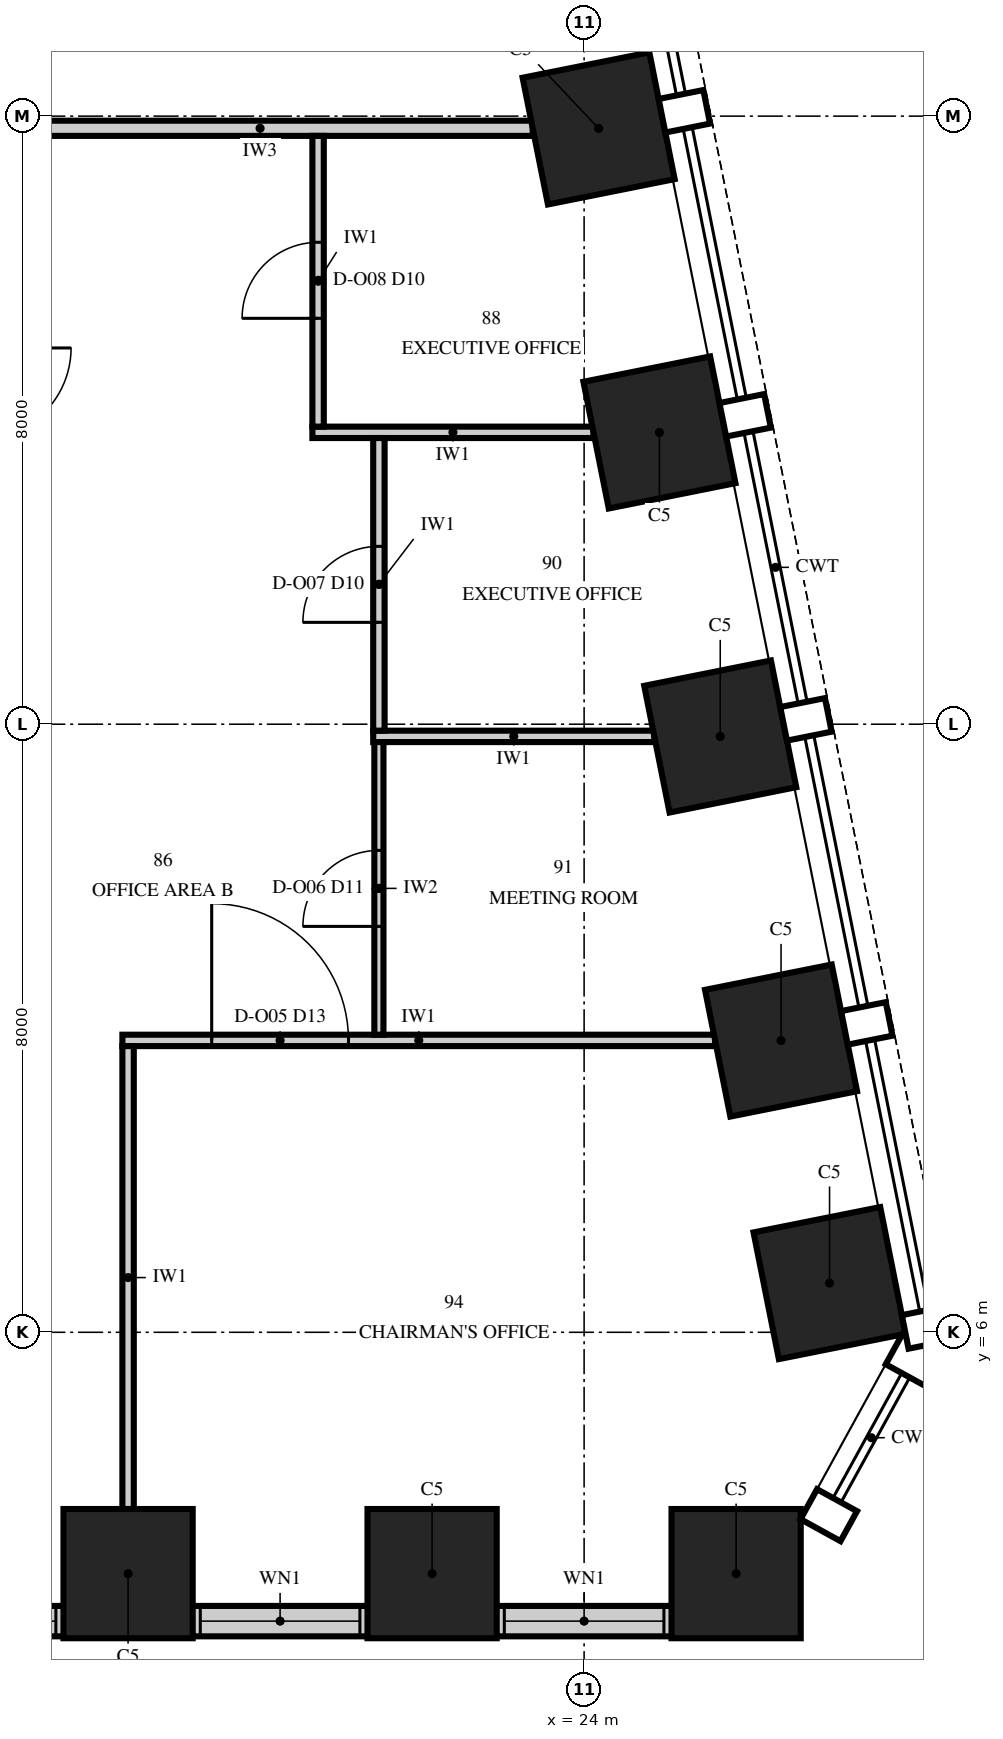
"""IFC4 building model, lengths in metres.
Left out: names, types, materials, properties, quantities, classifications, styles, units other than length and angle.
Written with IfcOpenShell. Run it as: python <this file> out.ifc"""

import sys

from ifc_helpers import new_model, si_unit, direction, frame, frame_2d, origin, origin_2d, place, context, subcontext, project, spatial, rectangle, extrude, element, fill, save


model = new_model("IFC4")
c1 = context("Model", 3, precision=1e-05, world=origin(), true_north=direction((0.0, 1.0)))
c2 = subcontext(c1, "Body", "Model", "MODEL_VIEW")
j1 = project(units=[si_unit("LENGTHUNIT", "METRE"), si_unit("PLANEANGLEUNIT", "RADIAN")], contexts=[c1])
p1 = place(None, origin())
s1 = spatial("IfcSite", under=j1, at=p1, CompositionType="ELEMENT")
p2 = place(p1, origin())
s2 = spatial("IfcBuilding", under=s1, at=p2, CompositionType="ELEMENT")
p3 = place(p2, frame((0.0, 0.0, 312.0)))
s3 = spatial("IfcBuildingStorey", under=s2, at=p3, CompositionType="ELEMENT", Elevation=312.0)
for number, where, z_axis, x_axis in (
    (1, (18.0, 2.825, 0.0), (0.0, 0.0, 1.0), (1.0, 0.0, 0.0)),
    (2, (22.0, 2.825, 0.0), (0.0, 0.0, 1.0), (1.0, 0.0, 0.0)),
    (3, (26.0, 2.825, 0.0), (0.0, 0.0, 1.0), (1.0, 0.0, 0.0)),
    (4, (27.229, 6.647, 0.0), (0.0, 0.0, 1.0), (-0.196, 0.981, 0.0)),
    (5, (26.591, 9.838, 0.0), (0.0, 0.0, 1.0), (-0.196, 0.981, 0.0)),
    (6, (25.791, 13.838, 0.0), (0.0, 0.0, 1.0), (-0.196, 0.981, 0.0)),
    (7, (24.991, 17.838, 0.0), (0.0, 0.0, 1.0), (-0.196, 0.981, 0.0)),
    (8, (24.191, 21.838, 0.0), (0.0, 0.0, 1.0), (-0.196, 0.981, 0.0)),
):
    element("IfcColumn", number, at=place(p3, frame(where, z_axis=z_axis, x_axis=x_axis)), inside=s3, PredefinedType="COLUMN", context=c2, shape_type="SweptSolid", body=[
        extrude(rectangle(XDim=1.7, YDim=1.7, at=origin_2d()), origin(), (0.0, 0.0, 1.0), 4.0),
    ])
p4 = place(p3, frame((-26.0, 2.2, 0.0), z_axis=(0.0, 0.0, 1.0), x_axis=(1.0, 0.0, 0.0)))
e9 = element("IfcWall", 9, at=p4, inside=s3, PredefinedType="SOLIDWALL", context=c2, shape_type="SweptSolid", body=[
    extrude(rectangle(XDim=52.0, YDim=0.4, at=frame_2d((26.0, 0.0))), origin(), (0.0, 0.0, 1.0), 2.0),
])
p5 = place(p4, frame((0.95, 0.0, 0.8)))
e10 = element("IfcOpeningElement", 10, at=p5, cuts=e9, PredefinedType="OPENING", context=c2, shape_type="SweptSolid", body=[
    extrude(rectangle(XDim=2.1, YDim=1.15, at=frame_2d((1.05, 0.575))), frame((0.0, 0.215, 0.0), z_axis=(0.0, -1.0, 0.0), x_axis=(1.0, 0.0, 0.0)), (0.0, 0.0, 1.0), 0.43),
])
p6 = place(p4, frame((4.95, 0.0, 0.8)))
e11 = element("IfcOpeningElement", 11, at=p6, cuts=e9, PredefinedType="OPENING", context=c2, shape_type="SweptSolid", body=[
    extrude(rectangle(XDim=2.1, YDim=1.15, at=frame_2d((1.05, 0.575))), frame((0.0, 0.215, 0.0), z_axis=(0.0, -1.0, 0.0), x_axis=(1.0, 0.0, 0.0)), (0.0, 0.0, 1.0), 0.43),
])
p7 = place(p4, frame((8.95, 0.0, 0.8)))
e12 = element("IfcOpeningElement", 12, at=p7, cuts=e9, PredefinedType="OPENING", context=c2, shape_type="SweptSolid", body=[
    extrude(rectangle(XDim=2.1, YDim=1.15, at=frame_2d((1.05, 0.575))), frame((0.0, 0.215, 0.0), z_axis=(0.0, -1.0, 0.0), x_axis=(1.0, 0.0, 0.0)), (0.0, 0.0, 1.0), 0.43),
])
p8 = place(p4, frame((12.95, 0.0, 0.8)))
e13 = element("IfcOpeningElement", 13, at=p8, cuts=e9, PredefinedType="OPENING", context=c2, shape_type="SweptSolid", body=[
    extrude(rectangle(XDim=2.1, YDim=1.15, at=frame_2d((1.05, 0.575))), frame((0.0, 0.215, 0.0), z_axis=(0.0, -1.0, 0.0), x_axis=(1.0, 0.0, 0.0)), (0.0, 0.0, 1.0), 0.43),
])
p9 = place(p4, frame((16.95, 0.0, 0.8)))
e14 = element("IfcOpeningElement", 14, at=p9, cuts=e9, PredefinedType="OPENING", context=c2, shape_type="SweptSolid", body=[
    extrude(rectangle(XDim=2.1, YDim=1.15, at=frame_2d((1.05, 0.575))), frame((0.0, 0.215, 0.0), z_axis=(0.0, -1.0, 0.0), x_axis=(1.0, 0.0, 0.0)), (0.0, 0.0, 1.0), 0.43),
])
p10 = place(p4, frame((20.95, 0.0, 0.8)))
e15 = element("IfcOpeningElement", 15, at=p10, cuts=e9, PredefinedType="OPENING", context=c2, shape_type="SweptSolid", body=[
    extrude(rectangle(XDim=2.1, YDim=1.15, at=frame_2d((1.05, 0.575))), frame((0.0, 0.215, 0.0), z_axis=(0.0, -1.0, 0.0), x_axis=(1.0, 0.0, 0.0)), (0.0, 0.0, 1.0), 0.43),
])
p11 = place(p4, frame((24.95, 0.0, 0.8)))
e16 = element("IfcOpeningElement", 16, at=p11, cuts=e9, PredefinedType="OPENING", context=c2, shape_type="SweptSolid", body=[
    extrude(rectangle(XDim=2.1, YDim=1.15, at=frame_2d((1.05, 0.575))), frame((0.0, 0.215, 0.0), z_axis=(0.0, -1.0, 0.0), x_axis=(1.0, 0.0, 0.0)), (0.0, 0.0, 1.0), 0.43),
])
p12 = place(p4, frame((28.95, 0.0, 0.8)))
e17 = element("IfcOpeningElement", 17, at=p12, cuts=e9, PredefinedType="OPENING", context=c2, shape_type="SweptSolid", body=[
    extrude(rectangle(XDim=2.1, YDim=1.15, at=frame_2d((1.05, 0.575))), frame((0.0, 0.215, 0.0), z_axis=(0.0, -1.0, 0.0), x_axis=(1.0, 0.0, 0.0)), (0.0, 0.0, 1.0), 0.43),
])
p13 = place(p4, frame((32.95, 0.0, 0.8)))
e18 = element("IfcOpeningElement", 18, at=p13, cuts=e9, PredefinedType="OPENING", context=c2, shape_type="SweptSolid", body=[
    extrude(rectangle(XDim=2.1, YDim=1.15, at=frame_2d((1.05, 0.575))), frame((0.0, 0.215, 0.0), z_axis=(0.0, -1.0, 0.0), x_axis=(1.0, 0.0, 0.0)), (0.0, 0.0, 1.0), 0.43),
])
p14 = place(p4, frame((36.95, 0.0, 0.8)))
e19 = element("IfcOpeningElement", 19, at=p14, cuts=e9, PredefinedType="OPENING", context=c2, shape_type="SweptSolid", body=[
    extrude(rectangle(XDim=2.1, YDim=1.15, at=frame_2d((1.05, 0.575))), frame((0.0, 0.215, 0.0), z_axis=(0.0, -1.0, 0.0), x_axis=(1.0, 0.0, 0.0)), (0.0, 0.0, 1.0), 0.43),
])
p15 = place(p4, frame((40.95, 0.0, 0.8)))
e20 = element("IfcOpeningElement", 20, at=p15, cuts=e9, PredefinedType="OPENING", context=c2, shape_type="SweptSolid", body=[
    extrude(rectangle(XDim=2.1, YDim=1.15, at=frame_2d((1.05, 0.575))), frame((0.0, 0.215, 0.0), z_axis=(0.0, -1.0, 0.0), x_axis=(1.0, 0.0, 0.0)), (0.0, 0.0, 1.0), 0.43),
])
p16 = place(p4, frame((44.95, 0.0, 0.8)))
e21 = element("IfcOpeningElement", 21, at=p16, cuts=e9, PredefinedType="OPENING", context=c2, shape_type="SweptSolid", body=[
    extrude(rectangle(XDim=2.1, YDim=1.15, at=frame_2d((1.05, 0.575))), frame((0.0, 0.215, 0.0), z_axis=(0.0, -1.0, 0.0), x_axis=(1.0, 0.0, 0.0)), (0.0, 0.0, 1.0), 0.43),
])
p17 = place(p4, frame((48.95, 0.0, 0.8)))
e22 = element("IfcOpeningElement", 22, at=p17, cuts=e9, PredefinedType="OPENING", context=c2, shape_type="SweptSolid", body=[
    extrude(rectangle(XDim=2.1, YDim=1.15, at=frame_2d((1.05, 0.575))), frame((0.0, 0.215, 0.0), z_axis=(0.0, -1.0, 0.0), x_axis=(1.0, 0.0, 0.0)), (0.0, 0.0, 1.0), 0.43),
])
p18 = place(p3, frame((17.925, 9.84, 0.0), z_axis=(0.0, 0.0, 1.0), x_axis=(1.0, 0.0, 0.0)))
e23 = element("IfcWall", 23, at=p18, inside=s3, PredefinedType="PARTITIONING", context=c2, shape_type="SweptSolid", body=[
    extrude(rectangle(XDim=7.799, YDim=0.15, at=frame_2d((3.899, 0.0))), origin(), (0.0, 0.0, 1.0), 3.23),
])
p19 = place(p18, frame((1.175, 0.0, 0.0)))
e24 = element("IfcOpeningElement", 24, at=p19, cuts=e23, PredefinedType="OPENING", context=c2, shape_type="SweptSolid", body=[
    extrude(rectangle(XDim=1.8, YDim=2.4, at=frame_2d((0.9, 1.2))), frame((0.0, 0.09, 0.0), z_axis=(0.0, -1.0, 0.0), x_axis=(1.0, 0.0, 0.0)), (0.0, 0.0, 1.0), 0.18),
])
for number, where, z_axis, x_axis in (
    (25, (21.225, 13.84, 0.0), (0.0, 0.0, 1.0), (1.0, 0.0, 0.0)),
    (26, (20.425, 17.84, 0.0), (0.0, 0.0, 1.0), (1.0, 0.0, 0.0)),
):
    element("IfcWall", number, at=place(p3, frame(where, z_axis=z_axis, x_axis=x_axis)), inside=s3, PredefinedType="PARTITIONING", context=c2, shape_type="SweptSolid", body=[
        extrude(rectangle(XDim=3.699, YDim=0.15, at=frame_2d((1.849, 0.0))), origin(), (0.0, 0.0, 1.0), 3.23),
    ])
p20 = place(p3, frame((16.15, 21.84, 0.0), z_axis=(0.0, 0.0, 1.0), x_axis=(1.0, 0.0, 0.0)))
e27 = element("IfcWall", 27, at=p20, inside=s3, PredefinedType="PARTITIONING", context=c2, shape_type="SweptSolid", body=[
    extrude(rectangle(XDim=7.174, YDim=0.2, at=frame_2d((3.587, 0.0))), origin(), (0.0, 0.0, 1.0), 3.23),
])
p21 = place(p3, frame((18.0, 3.675, 0.0), z_axis=(0.0, 0.0, 1.0), x_axis=(0.0, 1.0, 0.0)))
e28 = element("IfcWall", 28, at=p21, inside=s3, PredefinedType="PARTITIONING", context=c2, shape_type="SweptSolid", body=[
    extrude(rectangle(XDim=6.09, YDim=0.15, at=frame_2d((3.045, 0.0))), origin(), (0.0, 0.0, 1.0), 2.842),
])
p22 = place(p3, frame((20.5, 17.915, 0.0), z_axis=(0.0, 0.0, 1.0), x_axis=(0.0, 1.0, 0.0)))
e29 = element("IfcWall", 29, at=p22, inside=s3, PredefinedType="PARTITIONING", context=c2, shape_type="SweptSolid", body=[
    extrude(rectangle(XDim=3.825, YDim=0.15, at=frame_2d((1.913, 0.0))), origin(), (0.0, 0.0, 1.0), 3.23),
])
p23 = place(p22, frame((1.425, 0.0, 0.0)))
e30 = element("IfcOpeningElement", 30, at=p23, cuts=e29, PredefinedType="OPENING", context=c2, shape_type="SweptSolid", body=[
    extrude(rectangle(XDim=1.0, YDim=2.3, at=frame_2d((0.5, 1.15))), frame((0.0, 0.09, 0.0), z_axis=(0.0, -1.0, 0.0), x_axis=(1.0, 0.0, 0.0)), (0.0, 0.0, 1.0), 0.18),
])
p24 = place(p3, frame((21.3, 9.915, 0.0), z_axis=(0.0, 0.0, 1.0), x_axis=(0.0, 1.0, 0.0)))
e31 = element("IfcWall", 31, at=p24, inside=s3, PredefinedType="PARTITIONING", context=c2, shape_type="SweptSolid", body=[
    extrude(rectangle(XDim=3.85, YDim=0.12, at=frame_2d((1.925, 0.0))), origin(), (0.0, 0.0, 1.0), 3.85),
])
p25 = place(p24, frame((1.425, 0.0, 0.0)))
e32 = element("IfcOpeningElement", 32, at=p25, cuts=e31, PredefinedType="OPENING", context=c2, shape_type="SweptSolid", body=[
    extrude(rectangle(XDim=1.0, YDim=2.4, at=frame_2d((0.5, 1.2))), frame((0.0, 0.075, 0.0), z_axis=(0.0, -1.0, 0.0), x_axis=(1.0, 0.0, 0.0)), (0.0, 0.0, 1.0), 0.15),
])
p26 = place(p3, frame((21.3, 13.915, 0.0), z_axis=(0.0, 0.0, 1.0), x_axis=(0.0, 1.0, 0.0)))
e33 = element("IfcWall", 33, at=p26, inside=s3, PredefinedType="PARTITIONING", context=c2, shape_type="SweptSolid", body=[
    extrude(rectangle(XDim=3.85, YDim=0.15, at=frame_2d((1.925, 0.0))), origin(), (0.0, 0.0, 1.0), 3.23),
])
p27 = place(p26, frame((1.425, 0.0, 0.0)))
e34 = element("IfcOpeningElement", 34, at=p27, cuts=e33, PredefinedType="OPENING", context=c2, shape_type="SweptSolid", body=[
    extrude(rectangle(XDim=1.0, YDim=2.3, at=frame_2d((0.5, 1.15))), frame((0.0, 0.09, 0.0), z_axis=(0.0, -1.0, 0.0), x_axis=(1.0, 0.0, 0.0)), (0.0, 0.0, 1.0), 0.18),
])
p28 = place(p15, origin())
e35 = element("IfcWindow", 35, at=p28, inside=s3, PartitioningType="SINGLE_PANEL", PredefinedType="WINDOW", context=c2, shape_type="SweptSolid", body=[
    extrude(rectangle(XDim=2.1, YDim=1.15, at=frame_2d((1.05, 0.575))), frame((0.0, 0.03, 0.0), z_axis=(0.0, -1.0, 0.0), x_axis=(1.0, 0.0, 0.0)), (0.0, 0.0, 1.0), 0.06),
])
fill(e20, e35)
p29 = place(p16, origin())
e36 = element("IfcWindow", 36, at=p29, inside=s3, PartitioningType="SINGLE_PANEL", PredefinedType="WINDOW", context=c2, shape_type="SweptSolid", body=[
    extrude(rectangle(XDim=2.1, YDim=1.15, at=frame_2d((1.05, 0.575))), frame((0.0, 0.03, 0.0), z_axis=(0.0, -1.0, 0.0), x_axis=(1.0, 0.0, 0.0)), (0.0, 0.0, 1.0), 0.06),
])
fill(e21, e36)
p30 = place(p17, origin())
e37 = element("IfcWindow", 37, at=p30, inside=s3, PartitioningType="SINGLE_PANEL", PredefinedType="WINDOW", context=c2, shape_type="SweptSolid", body=[
    extrude(rectangle(XDim=2.1, YDim=1.15, at=frame_2d((1.05, 0.575))), frame((0.0, 0.03, 0.0), z_axis=(0.0, -1.0, 0.0), x_axis=(1.0, 0.0, 0.0)), (0.0, 0.0, 1.0), 0.06),
])
fill(e22, e37)
p31 = place(p19, origin())
e38 = element("IfcDoor", 38, at=p31, inside=s3, OperationType="DOUBLE_DOOR_SINGLE_SWING", PredefinedType="DOOR", context=c2, shape_type="SweptSolid", body=[
    extrude(rectangle(XDim=1.8, YDim=2.4, at=frame_2d((0.9, 1.2))), frame((0.0, 0.075, 0.0), z_axis=(0.0, -1.0, 0.0), x_axis=(1.0, 0.0, 0.0)), (0.0, 0.0, 1.0), 0.149),
])
fill(e24, e38)
p32 = place(p25, origin())
e39 = element("IfcDoor", 39, at=p32, inside=s3, OperationType="SINGLE_SWING_RIGHT", PredefinedType="DOOR", context=c2, shape_type="SweptSolid", body=[
    extrude(rectangle(XDim=1.0, YDim=2.4, at=frame_2d((0.5, 1.2))), frame((0.0, 0.06, 0.0), z_axis=(0.0, -1.0, 0.0), x_axis=(1.0, 0.0, 0.0)), (0.0, 0.0, 1.0), 0.12),
])
fill(e32, e39)
p33 = place(p27, origin())
e40 = element("IfcDoor", 40, at=p33, inside=s3, OperationType="SINGLE_SWING_LEFT", PredefinedType="DOOR", context=c2, shape_type="SweptSolid", body=[
    extrude(rectangle(XDim=1.0, YDim=2.3, at=frame_2d((0.5, 1.15))), frame((0.0, 0.075, 0.0), z_axis=(0.0, -1.0, 0.0), x_axis=(1.0, 0.0, 0.0)), (0.0, 0.0, 1.0), 0.149),
])
fill(e34, e40)
p34 = place(p23, origin())
e41 = element("IfcDoor", 41, at=p34, inside=s3, OperationType="SINGLE_SWING_LEFT", PredefinedType="DOOR", context=c2, shape_type="SweptSolid", body=[
    extrude(rectangle(XDim=1.0, YDim=2.3, at=frame_2d((0.5, 1.15))), frame((0.0, 0.075, 0.0), z_axis=(0.0, -1.0, 0.0), x_axis=(1.0, 0.0, 0.0)), (0.0, 0.0, 1.0), 0.149),
])
fill(e30, e41)
save(model, sys.argv[1])
